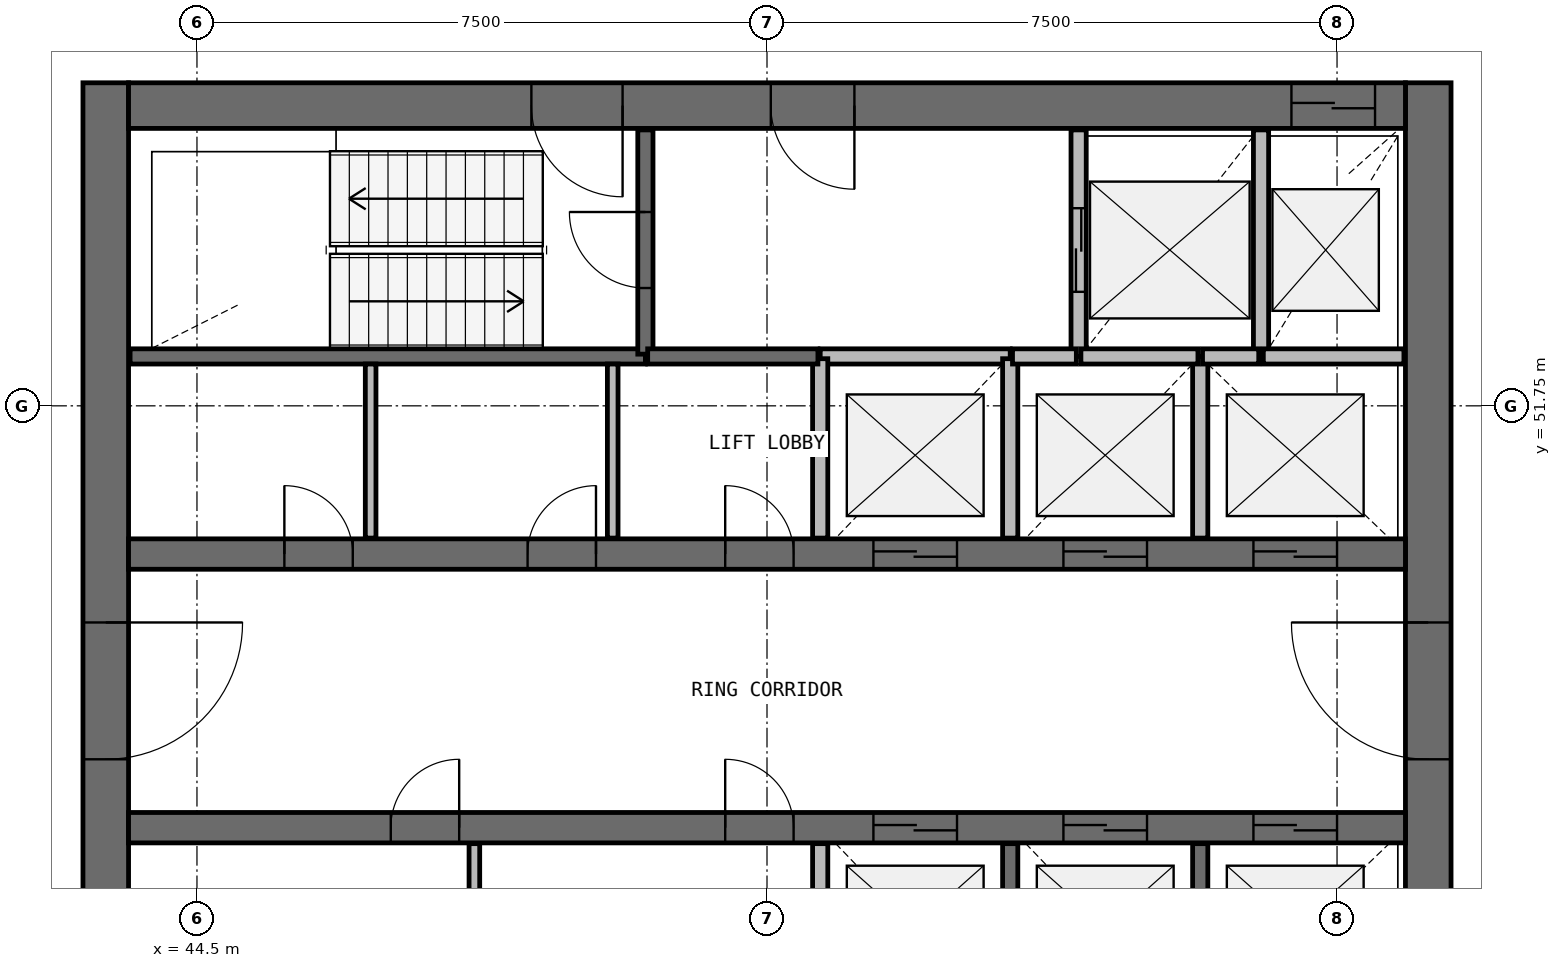
"""IFC4 building model, lengths in metres.
Left out: names, types, materials, properties, quantities, classifications, styles, units other than length and angle.
Written with IfcOpenShell. Run it as: python <this file> out.ifc"""

import sys

from ifc_helpers import new_model, si_unit, direction, frame, frame_2d, origin, place, context, subcontext, project, spatial, rectangle, extrude, source, transform, mapped, element, fill, save


model = new_model("IFC4")
c1 = context("Model", 3, precision=1e-05, world=origin(), true_north=direction((0.0, 1.0)))
c2 = subcontext(c1, "Body", "Model", "MODEL_VIEW")
j1 = project(units=[si_unit("LENGTHUNIT", "METRE"), si_unit("PLANEANGLEUNIT", "RADIAN")], contexts=[c1])
p1 = place(None, origin())
s1 = spatial("IfcSite", under=j1, at=p1, CompositionType="ELEMENT")
p2 = place(p1, origin())
s2 = spatial("IfcBuilding", under=s1, at=p2, CompositionType="ELEMENT")
p3 = place(p2, frame((0.0, 0.0, 261.8)))
s3 = spatial("IfcBuildingStorey", under=s2, at=p3, CompositionType="ELEMENT", Elevation=261.8)
p4 = place(p3, frame((60.7, 40.0, 0.0), z_axis=(0.0, 0.0, 1.0), x_axis=(0.0, 1.0, 0.0)))
e1 = element("IfcWall", 1, at=p4, inside=s3, PredefinedType="SHEAR", context=c2, shape_type="SweptSolid", body=[
    extrude(rectangle(XDim=16.0, YDim=0.6, at=frame_2d((8.0, 0.0))), origin(), (0.0, 0.0, 1.0), 3.9),
])
p5 = place(p4, frame((7.1, 0.0, 0.0)))
e2 = element("IfcOpeningElement", 2, at=p5, cuts=e1, PredefinedType="OPENING", context=c2, shape_type="SweptSolid", body=[
    extrude(rectangle(XDim=1.8, YDim=2.1, at=frame_2d((0.9, 1.05))), frame((0.0, 0.31, 0.0), z_axis=(0.0, -1.0, 0.0), x_axis=(1.0, 0.0, 0.0)), (0.0, 0.0, 1.0), 0.62),
])
p6 = place(p3, frame((43.3, 56.0, 0.0), z_axis=(0.0, 0.0, 1.0), x_axis=(0.0, -1.0, 0.0)))
e3 = element("IfcWall", 3, at=p6, inside=s3, PredefinedType="SHEAR", context=c2, shape_type="SweptSolid", body=[
    extrude(rectangle(XDim=16.0, YDim=0.6, at=frame_2d((8.0, 0.0))), origin(), (0.0, 0.0, 1.0), 3.9),
])
p7 = place(p6, frame((7.1, 0.0, 0.0)))
e4 = element("IfcOpeningElement", 4, at=p7, cuts=e3, PredefinedType="OPENING", context=c2, shape_type="SweptSolid", body=[
    extrude(rectangle(XDim=1.8, YDim=2.1, at=frame_2d((0.9, 1.05))), frame((0.0, 0.31, 0.0), z_axis=(0.0, -1.0, 0.0), x_axis=(1.0, 0.0, 0.0)), (0.0, 0.0, 1.0), 0.62),
])
p8 = place(p3, frame((60.4, 55.7, 0.0), z_axis=(0.0, 0.0, 1.0), x_axis=(-1.0, 0.0, 0.0)))
e5 = element("IfcWall", 5, at=p8, inside=s3, PredefinedType="SHEAR", context=c2, shape_type="SweptSolid", body=[
    extrude(rectangle(XDim=16.8, YDim=0.6, at=frame_2d((8.4, 0.0))), origin(), (0.0, 0.0, 1.0), 3.9),
])
p9 = place(p8, frame((0.4, 0.0, 0.0)))
e6 = element("IfcOpeningElement", 6, at=p9, cuts=e5, PredefinedType="OPENING", context=c2, shape_type="SweptSolid", body=[
    extrude(rectangle(XDim=1.1, YDim=2.1, at=frame_2d((0.55, 1.05))), frame((0.0, 0.31, 0.0), z_axis=(0.0, -1.0, 0.0), x_axis=(1.0, 0.0, 0.0)), (0.0, 0.0, 1.0), 0.62),
])
p10 = place(p8, frame((10.3, 0.0, 0.0)))
e7 = element("IfcOpeningElement", 7, at=p10, cuts=e5, PredefinedType="OPENING", context=c2, shape_type="SweptSolid", body=[
    extrude(rectangle(XDim=1.2, YDim=2.1, at=frame_2d((0.6, 1.05))), frame((0.0, 0.31, 0.0), z_axis=(0.0, -1.0, 0.0), x_axis=(1.0, 0.0, 0.0)), (0.0, 0.0, 1.0), 0.62),
])
p11 = place(p8, frame((7.25, 0.0, 0.0)))
e8 = element("IfcOpeningElement", 8, at=p11, cuts=e5, PredefinedType="OPENING", context=c2, shape_type="SweptSolid", body=[
    extrude(rectangle(XDim=1.1, YDim=2.1, at=frame_2d((0.55, 1.05))), frame((0.0, 0.31, 0.0), z_axis=(0.0, -1.0, 0.0), x_axis=(1.0, 0.0, 0.0)), (0.0, 0.0, 1.0), 0.62),
])
p12 = place(p3, frame((43.6, 49.8, 0.0), z_axis=(0.0, 0.0, 1.0), x_axis=(1.0, 0.0, 0.0)))
e9 = element("IfcWall", 9, at=p12, inside=s3, PredefinedType="SHEAR", context=c2, shape_type="SweptSolid", body=[
    extrude(rectangle(XDim=16.8, YDim=0.4, at=frame_2d((8.4, 0.0))), origin(), (0.0, 0.0, 1.0), 3.9),
])
p13 = place(p12, frame((9.8, 0.0, 0.0)))
e10 = element("IfcOpeningElement", 10, at=p13, cuts=e9, PredefinedType="OPENING", context=c2, shape_type="SweptSolid", body=[
    extrude(rectangle(XDim=1.1, YDim=2.1, at=frame_2d((0.55, 1.05))), frame((0.0, 0.21, 0.0), z_axis=(0.0, -1.0, 0.0), x_axis=(1.0, 0.0, 0.0)), (0.0, 0.0, 1.0), 0.42),
])
p14 = place(p12, frame((12.3, 0.0, 0.0)))
e11 = element("IfcOpeningElement", 11, at=p14, cuts=e9, PredefinedType="OPENING", context=c2, shape_type="SweptSolid", body=[
    extrude(rectangle(XDim=1.1, YDim=2.1, at=frame_2d((0.55, 1.05))), frame((0.0, 0.21, 0.0), z_axis=(0.0, -1.0, 0.0), x_axis=(1.0, 0.0, 0.0)), (0.0, 0.0, 1.0), 0.42),
])
p15 = place(p12, frame((14.8, 0.0, 0.0)))
e12 = element("IfcOpeningElement", 12, at=p15, cuts=e9, PredefinedType="OPENING", context=c2, shape_type="SweptSolid", body=[
    extrude(rectangle(XDim=1.1, YDim=2.1, at=frame_2d((0.55, 1.05))), frame((0.0, 0.21, 0.0), z_axis=(0.0, -1.0, 0.0), x_axis=(1.0, 0.0, 0.0)), (0.0, 0.0, 1.0), 0.42),
])
p16 = place(p12, frame((2.05, 0.0, 0.0)))
e13 = element("IfcOpeningElement", 13, at=p16, cuts=e9, PredefinedType="OPENING", context=c2, shape_type="SweptSolid", body=[
    extrude(rectangle(XDim=0.9, YDim=2.1, at=frame_2d((0.45, 1.05))), frame((0.0, 0.21, 0.0), z_axis=(0.0, -1.0, 0.0), x_axis=(1.0, 0.0, 0.0)), (0.0, 0.0, 1.0), 0.42),
])
p17 = place(p12, frame((5.25, 0.0, 0.0)))
e14 = element("IfcOpeningElement", 14, at=p17, cuts=e9, PredefinedType="OPENING", context=c2, shape_type="SweptSolid", body=[
    extrude(rectangle(XDim=0.9, YDim=2.1, at=frame_2d((0.45, 1.05))), frame((0.0, 0.21, 0.0), z_axis=(0.0, -1.0, 0.0), x_axis=(1.0, 0.0, 0.0)), (0.0, 0.0, 1.0), 0.42),
])
p18 = place(p12, frame((7.85, 0.0, 0.0)))
e15 = element("IfcOpeningElement", 15, at=p18, cuts=e9, PredefinedType="OPENING", context=c2, shape_type="SweptSolid", body=[
    extrude(rectangle(XDim=0.9, YDim=2.1, at=frame_2d((0.45, 1.05))), frame((0.0, 0.21, 0.0), z_axis=(0.0, -1.0, 0.0), x_axis=(1.0, 0.0, 0.0)), (0.0, 0.0, 1.0), 0.42),
])
p19 = place(p3, frame((43.6, 46.2, 0.0), z_axis=(0.0, 0.0, 1.0), x_axis=(1.0, 0.0, 0.0)))
e16 = element("IfcWall", 16, at=p19, inside=s3, PredefinedType="SHEAR", context=c2, shape_type="SweptSolid", body=[
    extrude(rectangle(XDim=16.8, YDim=0.4, at=frame_2d((8.4, 0.0))), origin(), (0.0, 0.0, 1.0), 3.9),
])
p20 = place(p19, frame((9.8, 0.0, 0.0)))
e17 = element("IfcOpeningElement", 17, at=p20, cuts=e16, PredefinedType="OPENING", context=c2, shape_type="SweptSolid", body=[
    extrude(rectangle(XDim=1.1, YDim=2.1, at=frame_2d((0.55, 1.05))), frame((0.0, 0.21, 0.0), z_axis=(0.0, -1.0, 0.0), x_axis=(1.0, 0.0, 0.0)), (0.0, 0.0, 1.0), 0.42),
])
p21 = place(p19, frame((12.3, 0.0, 0.0)))
e18 = element("IfcOpeningElement", 18, at=p21, cuts=e16, PredefinedType="OPENING", context=c2, shape_type="SweptSolid", body=[
    extrude(rectangle(XDim=1.1, YDim=2.1, at=frame_2d((0.55, 1.05))), frame((0.0, 0.21, 0.0), z_axis=(0.0, -1.0, 0.0), x_axis=(1.0, 0.0, 0.0)), (0.0, 0.0, 1.0), 0.42),
])
p22 = place(p19, frame((14.8, 0.0, 0.0)))
e19 = element("IfcOpeningElement", 19, at=p22, cuts=e16, PredefinedType="OPENING", context=c2, shape_type="SweptSolid", body=[
    extrude(rectangle(XDim=1.1, YDim=2.1, at=frame_2d((0.55, 1.05))), frame((0.0, 0.21, 0.0), z_axis=(0.0, -1.0, 0.0), x_axis=(1.0, 0.0, 0.0)), (0.0, 0.0, 1.0), 0.42),
])
p23 = place(p19, frame((3.45, 0.0, 0.0)))
e20 = element("IfcOpeningElement", 20, at=p23, cuts=e16, PredefinedType="OPENING", context=c2, shape_type="SweptSolid", body=[
    extrude(rectangle(XDim=0.9, YDim=2.1, at=frame_2d((0.45, 1.05))), frame((0.0, 0.21, 0.0), z_axis=(0.0, -1.0, 0.0), x_axis=(1.0, 0.0, 0.0)), (0.0, 0.0, 1.0), 0.42),
])
p24 = place(p19, frame((7.85, 0.0, 0.0)))
e21 = element("IfcOpeningElement", 21, at=p24, cuts=e16, PredefinedType="OPENING", context=c2, shape_type="SweptSolid", body=[
    extrude(rectangle(XDim=0.9, YDim=2.1, at=frame_2d((0.45, 1.05))), frame((0.0, 0.21, 0.0), z_axis=(0.0, -1.0, 0.0), x_axis=(1.0, 0.0, 0.0)), (0.0, 0.0, 1.0), 0.42),
])
p25 = place(p3, frame((43.62, 52.4, 0.0), z_axis=(0.0, 0.0, 1.0), x_axis=(1.0, 0.0, 0.0)))
e22 = element("IfcWall", 22, at=p25, inside=s3, PredefinedType="SOLIDWALL", context=c2, shape_type="SweptSolid", body=[
    extrude(rectangle(XDim=6.78, YDim=0.2, at=frame_2d((3.39, 0.0))), origin(), (0.0, 0.0, 1.0), 3.45),
])
p26 = place(p3, frame((50.4, 52.43, 0.0), z_axis=(0.0, 0.0, 1.0), x_axis=(0.0, 1.0, 0.0)))
e23 = element("IfcWall", 23, at=p26, inside=s3, PredefinedType="SOLIDWALL", context=c2, shape_type="SweptSolid", body=[
    extrude(rectangle(XDim=2.95, YDim=0.2, at=frame_2d((1.475, 0.0))), origin(), (0.0, 0.0, 1.0), 3.45),
])
p27 = place(p26, frame((0.87, 0.0, 0.0)))
e24 = element("IfcOpeningElement", 24, at=p27, cuts=e23, PredefinedType="OPENING", context=c2, shape_type="SweptSolid", body=[
    extrude(rectangle(XDim=1.0, YDim=2.1, at=frame_2d((0.5, 1.05))), frame((0.0, 0.11, 0.0), z_axis=(0.0, -1.0, 0.0), x_axis=(1.0, 0.0, 0.0)), (0.0, 0.0, 1.0), 0.22),
])
p28 = place(p3, frame((56.1, 55.38, 0.0), z_axis=(0.0, 0.0, 1.0), x_axis=(0.0, -1.0, 0.0)))
e25 = element("IfcWall", 25, at=p28, inside=s3, PredefinedType="SOLIDWALL", context=c2, shape_type="SweptSolid", body=[
    extrude(rectangle(XDim=2.98, YDim=0.2, at=frame_2d((1.49, 0.0))), origin(), (0.0, 0.0, 1.0), 3.45),
])
p29 = place(p28, frame((1.03, 0.0, 0.0)))
e26 = element("IfcOpeningElement", 26, at=p29, cuts=e25, PredefinedType="OPENING", context=c2, shape_type="SweptSolid", body=[
    extrude(rectangle(XDim=1.1, YDim=2.1, at=frame_2d((0.55, 1.05))), frame((0.0, 0.11, 0.0), z_axis=(0.0, -1.0, 0.0), x_axis=(1.0, 0.0, 0.0)), (0.0, 0.0, 1.0), 0.22),
])
p30 = place(p3, frame((58.5, 52.4, 0.0), z_axis=(0.0, 0.0, 1.0), x_axis=(0.0, 1.0, 0.0)))
e27 = element("IfcWall", 27, at=p30, inside=s3, PredefinedType="SOLIDWALL", context=c2, shape_type="SweptSolid", body=[
    extrude(rectangle(XDim=2.98, YDim=0.2, at=frame_2d((1.49, 0.0))), origin(), (0.0, 0.0, 1.0), 3.45),
])
p31 = place(p3, frame((55.2, 52.4, 0.0), z_axis=(0.0, 0.0, 1.0), x_axis=(-1.0, 0.0, 0.0)))
e28 = element("IfcWall", 28, at=p31, inside=s3, PredefinedType="SOLIDWALL", context=c2, shape_type="SweptSolid", body=[
    extrude(rectangle(XDim=2.5, YDim=0.2, at=frame_2d((1.25, 0.0))), origin(), (0.0, 0.0, 1.0), 3.45),
])
for number, where, z_axis, x_axis in (
    (29, (52.7, 45.99, 0.0), (0.0, 0.0, 1.0), (0.0, -1.0, 0.0)),
    (30, (52.7, 52.37, 0.0), (0.0, 0.0, 1.0), (0.0, -1.0, 0.0)),
    (31, (55.2, 43.63, 0.0), (0.0, 0.0, 1.0), (0.0, 1.0, 0.0)),
    (32, (55.2, 50.01, 0.0), (0.0, 0.0, 1.0), (0.0, 1.0, 0.0)),
    (33, (57.7, 43.63, 0.0), (0.0, 0.0, 1.0), (0.0, 1.0, 0.0)),
):
    element("IfcWall", number, at=place(p3, frame(where, z_axis=z_axis, x_axis=x_axis)), inside=s3, PredefinedType="SOLIDWALL", context=c2, shape_type="SweptSolid", body=[
        extrude(rectangle(XDim=2.36, YDim=0.2, at=frame_2d((1.18, 0.0))), origin(), (0.0, 0.0, 1.0), 3.45),
    ])
p32 = place(p3, frame((57.7, 50.01, 0.0), z_axis=(0.0, 0.0, 1.0), x_axis=(0.0, 1.0, 0.0)))
e34 = element("IfcWall", 34, at=p32, inside=s3, PredefinedType="SOLIDWALL", context=c2, shape_type="SweptSolid", body=[
    extrude(rectangle(XDim=2.39, YDim=0.2, at=frame_2d((1.195, 0.0))), origin(), (0.0, 0.0, 1.0), 3.45),
])
p33 = place(p3, frame((50.43, 52.4, 0.0), z_axis=(0.0, 0.0, 1.0), x_axis=(1.0, 0.0, 0.0)))
e35 = element("IfcWall", 35, at=p33, inside=s3, PredefinedType="SOLIDWALL", context=c2, shape_type="SweptSolid", body=[
    extrude(rectangle(XDim=2.24, YDim=0.2, at=frame_2d((1.12, 0.0))), origin(), (0.0, 0.0, 1.0), 3.45),
])
p34 = place(p3, frame((60.38, 52.4, 0.0), z_axis=(0.0, 0.0, 1.0), x_axis=(-1.0, 0.0, 0.0)))
e36 = element("IfcWall", 36, at=p34, inside=s3, PredefinedType="SOLIDWALL", context=c2, shape_type="SweptSolid", body=[
    extrude(rectangle(XDim=1.85, YDim=0.2, at=frame_2d((0.925, 0.0))), origin(), (0.0, 0.0, 1.0), 3.45),
])
p35 = place(p3, frame((57.67, 52.4, 0.0), z_axis=(0.0, 0.0, 1.0), x_axis=(-1.0, 0.0, 0.0)))
e37 = element("IfcWall", 37, at=p35, inside=s3, PredefinedType="SOLIDWALL", context=c2, shape_type="SweptSolid", body=[
    extrude(rectangle(XDim=1.54, YDim=0.2, at=frame_2d((0.77, 0.0))), origin(), (0.0, 0.0, 1.0), 3.45),
])
p36 = place(p3, frame((56.07, 52.4, 0.0), z_axis=(0.0, 0.0, 1.0), x_axis=(-1.0, 0.0, 0.0)))
e38 = element("IfcWall", 38, at=p36, inside=s3, PredefinedType="SOLIDWALL", context=c2, shape_type="SweptSolid", body=[
    extrude(rectangle(XDim=0.84, YDim=0.2, at=frame_2d((0.42, 0.0))), origin(), (0.0, 0.0, 1.0), 3.45),
])
p37 = place(p3, frame((58.47, 52.4, 0.0), z_axis=(0.0, 0.0, 1.0), x_axis=(-1.0, 0.0, 0.0)))
e39 = element("IfcWall", 39, at=p37, inside=s3, PredefinedType="SOLIDWALL", context=c2, shape_type="SweptSolid", body=[
    extrude(rectangle(XDim=0.74, YDim=0.2, at=frame_2d((0.37, 0.0))), origin(), (0.0, 0.0, 1.0), 3.45),
])
for number, where, z_axis, x_axis in (
    (40, (46.785, 50.01, 0.0), (0.0, 0.0, 1.0), (0.0, 1.0, 0.0)),
    (41, (48.15, 43.7, 0.0), (0.0, 0.0, 1.0), (0.0, 1.0, 0.0)),
    (42, (49.97, 50.01, 0.0), (0.0, 0.0, 1.0), (0.0, 1.0, 0.0)),
):
    element("IfcWall", number, at=place(p3, frame(where, z_axis=z_axis, x_axis=x_axis)), inside=s3, PredefinedType="PARTITIONING", context=c2, shape_type="SweptSolid", body=[
        extrude(rectangle(XDim=2.29, YDim=0.14, at=frame_2d((1.145, 0.0))), origin(), (0.0, 0.0, 1.0), 2.75),
    ])
m1 = source(origin(), c2, "Body", "SweptSolid", [
    extrude(rectangle(XDim=1.8, YDim=2.1, at=frame_2d((0.9, 1.05))), frame((0.0, 0.025, 0.0), z_axis=(0.0, -1.0, 0.0), x_axis=(1.0, 0.0, 0.0)), (0.0, 0.0, 1.0), 0.05),
])
p38 = place(p7, origin())
e43 = element("IfcDoor", 43, at=p38, inside=s3, OperationType="SINGLE_SWING_LEFT", PredefinedType="DOOR", context=c2, shape_type="MappedRepresentation", body=[
    mapped(m1, transform((0.0, 0.0, 0.0), scale=1.0)),
])
fill(e4, e43)
p39 = place(p5, origin())
e44 = element("IfcDoor", 44, at=p39, inside=s3, OperationType="SINGLE_SWING_RIGHT", PredefinedType="DOOR", context=c2, shape_type="MappedRepresentation", body=[
    mapped(m1, transform((0.0, 0.0, 0.0), scale=1.0)),
])
fill(e2, e44)
m2 = source(origin(), c2, "Body", "SweptSolid", [
    extrude(rectangle(XDim=1.1, YDim=2.1, at=frame_2d((0.55, 1.05))), frame((0.0, 0.025, 0.0), z_axis=(0.0, -1.0, 0.0), x_axis=(1.0, 0.0, 0.0)), (0.0, 0.0, 1.0), 0.05),
])
p40 = place(p13, origin())
e45 = element("IfcDoor", 45, at=p40, inside=s3, OperationType="DOUBLE_DOOR_SLIDING", PredefinedType="USERDEFINED", context=c2, shape_type="MappedRepresentation", body=[
    mapped(m2, transform((0.0, 0.0, 0.0), scale=1.0)),
])
fill(e10, e45)
p41 = place(p14, origin())
e46 = element("IfcDoor", 46, at=p41, inside=s3, OperationType="DOUBLE_DOOR_SLIDING", PredefinedType="USERDEFINED", context=c2, shape_type="MappedRepresentation", body=[
    mapped(m2, transform((0.0, 0.0, 0.0), scale=1.0)),
])
fill(e11, e46)
p42 = place(p15, origin())
e47 = element("IfcDoor", 47, at=p42, inside=s3, OperationType="DOUBLE_DOOR_SLIDING", PredefinedType="USERDEFINED", context=c2, shape_type="MappedRepresentation", body=[
    mapped(m2, transform((0.0, 0.0, 0.0), scale=1.0)),
])
fill(e12, e47)
p43 = place(p20, origin())
e48 = element("IfcDoor", 48, at=p43, inside=s3, OperationType="DOUBLE_DOOR_SLIDING", PredefinedType="USERDEFINED", context=c2, shape_type="MappedRepresentation", body=[
    mapped(m2, transform((0.0, 0.0, 0.0), scale=1.0)),
])
fill(e17, e48)
p44 = place(p21, origin())
e49 = element("IfcDoor", 49, at=p44, inside=s3, OperationType="DOUBLE_DOOR_SLIDING", PredefinedType="USERDEFINED", context=c2, shape_type="MappedRepresentation", body=[
    mapped(m2, transform((0.0, 0.0, 0.0), scale=1.0)),
])
fill(e18, e49)
p45 = place(p22, origin())
e50 = element("IfcDoor", 50, at=p45, inside=s3, OperationType="DOUBLE_DOOR_SLIDING", PredefinedType="USERDEFINED", context=c2, shape_type="MappedRepresentation", body=[
    mapped(m2, transform((0.0, 0.0, 0.0), scale=1.0)),
])
fill(e19, e50)
p46 = place(p29, origin())
e51 = element("IfcDoor", 51, at=p46, inside=s3, OperationType="DOUBLE_DOOR_SLIDING", PredefinedType="USERDEFINED", context=c2, shape_type="MappedRepresentation", body=[
    mapped(m2, transform((0.0, 0.0, 0.0), scale=1.0)),
])
fill(e26, e51)
p47 = place(p9, origin())
e52 = element("IfcDoor", 52, at=p47, inside=s3, OperationType="DOUBLE_DOOR_SLIDING", PredefinedType="USERDEFINED", context=c2, shape_type="MappedRepresentation", body=[
    mapped(m2, transform((0.0, 0.0, 0.0), scale=1.0)),
])
fill(e6, e52)
m3 = source(origin(), c2, "Body", "SweptSolid", [
    extrude(rectangle(XDim=1.2, YDim=2.1, at=frame_2d((0.6, 1.05))), frame((0.0, 0.025, 0.0), z_axis=(0.0, -1.0, 0.0), x_axis=(1.0, 0.0, 0.0)), (0.0, 0.0, 1.0), 0.05),
])
p48 = place(p10, origin())
e53 = element("IfcDoor", 53, at=p48, inside=s3, OperationType="SINGLE_SWING_LEFT", PredefinedType="DOOR", context=c2, shape_type="MappedRepresentation", body=[
    mapped(m3, transform((0.0, 0.0, 0.0), scale=1.0)),
])
fill(e7, e53)
m4 = source(origin(), c2, "Body", "SweptSolid", [
    extrude(rectangle(XDim=1.0, YDim=2.1, at=frame_2d((0.5, 1.05))), frame((0.0, 0.025, 0.0), z_axis=(0.0, -1.0, 0.0), x_axis=(1.0, 0.0, 0.0)), (0.0, 0.0, 1.0), 0.05),
])
p49 = place(p27, origin())
e54 = element("IfcDoor", 54, at=p49, inside=s3, OperationType="SINGLE_SWING_RIGHT", PredefinedType="DOOR", context=c2, shape_type="MappedRepresentation", body=[
    mapped(m4, transform((0.0, 0.0, 0.0), scale=1.0)),
])
fill(e24, e54)
m5 = source(origin(), c2, "Body", "SweptSolid", [
    extrude(rectangle(XDim=1.1, YDim=2.1, at=frame_2d((0.55, 1.05))), frame((0.0, 0.025, 0.0), z_axis=(0.0, -1.0, 0.0), x_axis=(1.0, 0.0, 0.0)), (0.0, 0.0, 1.0), 0.05),
])
p50 = place(p11, origin())
e55 = element("IfcDoor", 55, at=p50, inside=s3, OperationType="SINGLE_SWING_LEFT", PredefinedType="DOOR", context=c2, shape_type="MappedRepresentation", body=[
    mapped(m5, transform((0.0, 0.0, 0.0), scale=1.0)),
])
fill(e8, e55)
m6 = source(origin(), c2, "Body", "SweptSolid", [
    extrude(rectangle(XDim=0.9, YDim=2.1, at=frame_2d((0.45, 1.05))), frame((0.0, 0.025, 0.0), z_axis=(0.0, -1.0, 0.0), x_axis=(1.0, 0.0, 0.0)), (0.0, 0.0, 1.0), 0.05),
])
p51 = place(p16, origin())
e56 = element("IfcDoor", 56, at=p51, inside=s3, OperationType="SINGLE_SWING_LEFT", PredefinedType="DOOR", context=c2, shape_type="MappedRepresentation", body=[
    mapped(m6, transform((0.0, 0.0, 0.0), scale=1.0)),
])
fill(e13, e56)
p52 = place(p17, origin())
e57 = element("IfcDoor", 57, at=p52, inside=s3, OperationType="SINGLE_SWING_RIGHT", PredefinedType="DOOR", context=c2, shape_type="MappedRepresentation", body=[
    mapped(m6, transform((0.0, 0.0, 0.0), scale=1.0)),
])
fill(e14, e57)
p53 = place(p18, origin())
e58 = element("IfcDoor", 58, at=p53, inside=s3, OperationType="SINGLE_SWING_LEFT", PredefinedType="DOOR", context=c2, shape_type="MappedRepresentation", body=[
    mapped(m6, transform((0.0, 0.0, 0.0), scale=1.0)),
])
fill(e15, e58)
p54 = place(p23, origin())
e59 = element("IfcDoor", 59, at=p54, inside=s3, OperationType="SINGLE_SWING_RIGHT", PredefinedType="DOOR", context=c2, shape_type="MappedRepresentation", body=[
    mapped(m6, transform((0.0, 0.0, 0.0), scale=1.0)),
])
fill(e20, e59)
p55 = place(p24, origin())
e60 = element("IfcDoor", 60, at=p55, inside=s3, OperationType="SINGLE_SWING_LEFT", PredefinedType="DOOR", context=c2, shape_type="MappedRepresentation", body=[
    mapped(m6, transform((0.0, 0.0, 0.0), scale=1.0)),
])
fill(e21, e60)
save(model, sys.argv[1])
